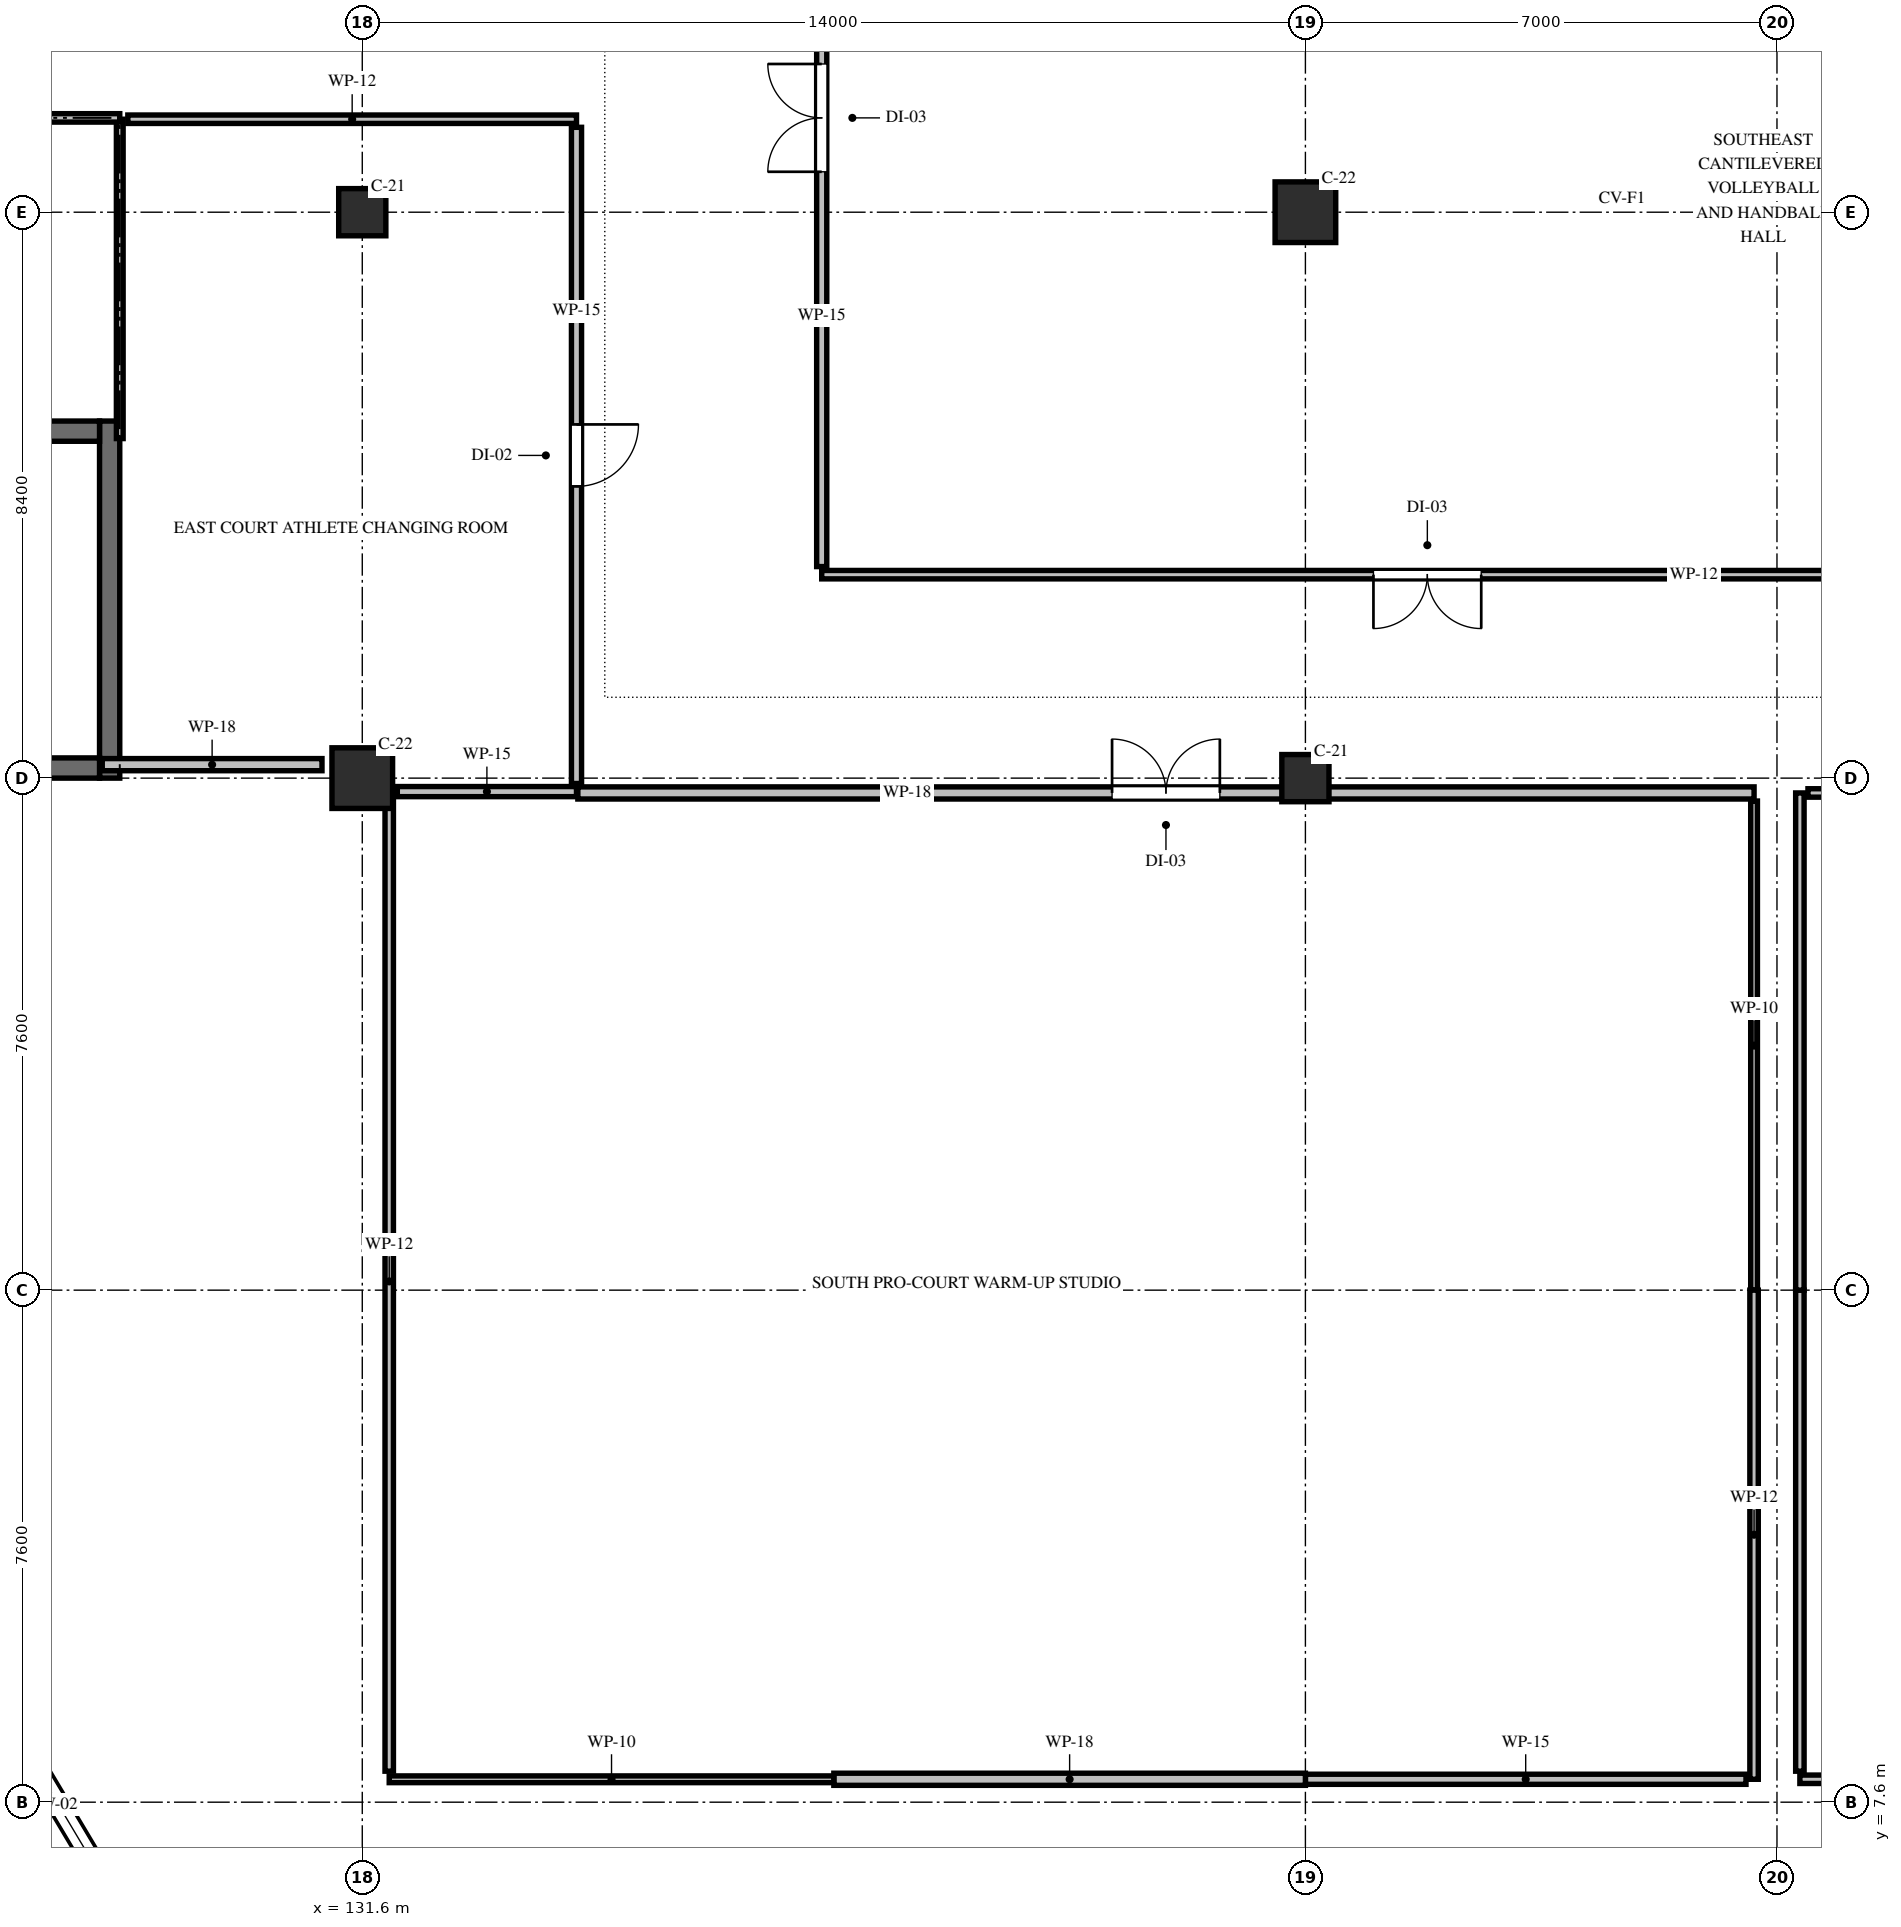
"""IFC4 building model, lengths in metres.
Left out: names, types, materials, properties, quantities, classifications, styles, units other than length and angle.
Written with IfcOpenShell. Run it as: python <this file> out.ifc"""

import sys

from ifc_helpers import new_model, si_unit, direction, frame, frame_2d, origin, origin_2d, place, context, subcontext, project, spatial, rectangle, hollow_rectangle, extrude, element, fill, save


model = new_model("IFC4")
c1 = context("Model", 3, precision=1e-05, world=origin(), true_north=direction((0.0, 1.0)))
c2 = subcontext(c1, "Body", "Model", "MODEL_VIEW")
j1 = project(units=[si_unit("LENGTHUNIT", "METRE"), si_unit("PLANEANGLEUNIT", "RADIAN")], contexts=[c1])
p1 = place(None, origin())
s1 = spatial("IfcSite", under=j1, at=p1, CompositionType="ELEMENT")
p2 = place(p1, origin())
s2 = spatial("IfcBuilding", under=s1, at=p2, CompositionType="ELEMENT")
p3 = place(p2, frame((0.0, 0.0, 16.8)))
s3 = spatial("IfcBuildingStorey", under=s2, at=p3, CompositionType="ELEMENT", Elevation=16.8)
p4 = place(p3, frame((131.6, 22.8, 0.0), z_axis=(0.0, 0.0, 1.0), x_axis=(1.0, 0.0, 0.0)))
e1 = element("IfcColumn", 1, at=p4, inside=s3, PredefinedType="COLUMN", context=c2, shape_type="SweptSolid", body=[
    extrude(hollow_rectangle(XDim=0.9, YDim=0.9, WallThickness=0.036, InnerFilletRadius=0.036, OuterFilletRadius=0.072, at=origin_2d()), origin(), (0.0, 0.0, 1.0), 5.4),
])
for number, where, z_axis, x_axis in (
    (2, (131.6, 31.2, 0.0), (0.0, 0.0, 1.0), (1.0, 0.0, 0.0)),
    (3, (145.6, 22.8, 0.0), (0.0, 0.0, 1.0), (1.0, 0.0, 0.0)),
):
    element("IfcColumn", number, at=place(p3, frame(where, z_axis=z_axis, x_axis=x_axis)), inside=s3, PredefinedType="COLUMN", context=c2, shape_type="SweptSolid", body=[
        extrude(hollow_rectangle(XDim=0.7, YDim=0.7, WallThickness=0.028, InnerFilletRadius=0.028, OuterFilletRadius=0.056, at=origin_2d()), origin(), (0.0, 0.0, 1.0), 5.4),
    ])
p5 = place(p3, frame((145.6, 31.2, 0.0), z_axis=(0.0, 0.0, 1.0), x_axis=(1.0, 0.0, 0.0)))
e4 = element("IfcColumn", 4, at=p5, inside=s3, PredefinedType="COLUMN", context=c2, shape_type="SweptSolid", body=[
    extrude(hollow_rectangle(XDim=0.9, YDim=0.9, WallThickness=0.036, InnerFilletRadius=0.036, OuterFilletRadius=0.072, at=origin_2d()), origin(), (0.0, 0.0, 1.0), 5.4),
])
p6 = place(p3, frame((128.268, 5.587, 0.0), z_axis=(0.0, 0.0, 1.0), x_axis=(-0.512267314441, 0.858826058382, 0.0)))
e5 = element("IfcWall", 5, at=p6, inside=s3, PredefinedType="SOLIDWALL", context=c2, shape_type="SweptSolid", body=[
    extrude(rectangle(XDim=6.901, YDim=0.275, at=frame_2d((3.45, 0.0))), origin(), (0.0, 0.0, 1.0), 5.1),
])
p7 = place(p6, frame((1.4, 0.0, 0.9)))
e6 = element("IfcOpeningElement", 6, at=p7, cuts=e5, PredefinedType="OPENING", context=c2, shape_type="SweptSolid", body=[
    extrude(rectangle(XDim=1.8, YDim=1.6, at=frame_2d((0.9, 0.8))), frame((0.0, 0.147, 0.0), z_axis=(0.0, -1.0, 0.0), x_axis=(1.0, 0.0, 0.0)), (0.0, 0.0, 1.0), 0.295),
])
p8 = place(p6, frame((3.701, 0.0, 0.9)))
e7 = element("IfcOpeningElement", 7, at=p8, cuts=e5, PredefinedType="OPENING", context=c2, shape_type="SweptSolid", body=[
    extrude(rectangle(XDim=1.8, YDim=1.6, at=frame_2d((0.9, 0.8))), frame((0.0, 0.147, 0.0), z_axis=(0.0, -1.0, 0.0), x_axis=(1.0, 0.0, 0.0)), (0.0, 0.0, 1.0), 0.295),
])
p9 = place(p3, frame((127.85, 28.1, 0.0), z_axis=(0.0, 0.0, 1.0), x_axis=(0.0, -1.0, 0.0)))
e8 = element("IfcWall", 8, at=p9, inside=s3, PredefinedType="SHEAR", context=c2, shape_type="SweptSolid", body=[
    extrude(rectangle(XDim=5.3, YDim=0.3, at=frame_2d((2.65, 0.0))), origin(), (0.0, 0.0, 1.0), 5.15),
])
p10 = place(p3, frame((127.7, 22.95, 0.0), z_axis=(0.0, 0.0, 1.0), x_axis=(-1.0, 0.0, 0.0)))
e9 = element("IfcWall", 9, at=p10, inside=s3, PredefinedType="SHEAR", context=c2, shape_type="SweptSolid", body=[
    extrude(rectangle(XDim=9.4, YDim=0.3, at=frame_2d((4.7, 0.0))), origin(), (0.0, 0.0, 1.0), 5.15),
])
p11 = place(p3, frame((118.3, 27.95, 0.0), z_axis=(0.0, 0.0, 1.0), x_axis=(1.0, 0.0, 0.0)))
e10 = element("IfcWall", 10, at=p11, inside=s3, PredefinedType="SHEAR", context=c2, shape_type="SweptSolid", body=[
    extrude(rectangle(XDim=9.4, YDim=0.3, at=frame_2d((4.7, 0.0))), origin(), (0.0, 0.0, 1.0), 5.15),
])
p12 = place(p11, frame((0.55, 0.0, 0.0)))
e11 = element("IfcOpeningElement", 11, at=p12, cuts=e10, PredefinedType="OPENING", context=c2, shape_type="SweptSolid", body=[
    extrude(rectangle(XDim=1.05, YDim=2.2, at=frame_2d((0.525, 1.1))), frame((0.0, 0.16, 0.0), z_axis=(0.0, -1.0, 0.0), x_axis=(1.0, 0.0, 0.0)), (0.0, 0.0, 1.0), 0.32),
])
p13 = place(p3, frame((156.4, 25.82, 0.0), z_axis=(0.0, 0.0, 1.0), x_axis=(-1.0, 0.0, 0.0)))
e12 = element("IfcWall", 12, at=p13, inside=s3, PredefinedType="PARTITIONING", context=c2, shape_type="SweptSolid", body=[
    extrude(rectangle(XDim=17.98, YDim=0.125, at=frame_2d((8.99, 0.0))), origin(), (0.0, 0.0, 1.0), 4.56),
])
p14 = place(p13, frame((8.19, 0.0, 0.0)))
e13 = element("IfcOpeningElement", 13, at=p14, cuts=e12, PredefinedType="OPENING", context=c2, shape_type="SweptSolid", body=[
    extrude(rectangle(XDim=1.6, YDim=2.2, at=frame_2d((0.8, 1.1))), frame((0.0, 0.073, 0.0), z_axis=(0.0, -1.0, 0.0), x_axis=(1.0, 0.0, 0.0)), (0.0, 0.0, 1.0), 0.145),
])
p15 = place(p3, frame((138.42, 25.94, 0.0), z_axis=(0.0, 0.0, 1.0), x_axis=(0.0, 1.0, 0.0)))
e14 = element("IfcWall", 14, at=p15, inside=s3, PredefinedType="PARTITIONING", context=c2, shape_type="SweptSolid", body=[
    extrude(rectangle(XDim=13.32, YDim=0.15, at=frame_2d((6.66, 0.0))), origin(), (0.0, 0.0, 1.0), 3.51),
])
p16 = place(p15, frame((5.86, 0.0, 0.0)))
e15 = element("IfcOpeningElement", 15, at=p16, cuts=e14, PredefinedType="OPENING", context=c2, shape_type="SweptSolid", body=[
    extrude(rectangle(XDim=1.6, YDim=2.2, at=frame_2d((0.8, 1.1))), frame((0.0, 0.085, 0.0), z_axis=(0.0, -1.0, 0.0), x_axis=(1.0, 0.0, 0.0)), (0.0, 0.0, 1.0), 0.17),
])
p17 = place(p3, frame((134.8, 22.58, 0.0), z_axis=(0.0, 0.0, 1.0), x_axis=(1.0, 0.0, 0.0)))
e16 = element("IfcWall", 16, at=p17, inside=s3, PredefinedType="PARTITIONING", context=c2, shape_type="SweptSolid", body=[
    extrude(rectangle(XDim=17.46, YDim=0.18, at=frame_2d((8.73, 0.0))), origin(), (0.0, 0.0, 1.0), 3.51),
])
p18 = place(p17, frame((7.93, 0.0, 0.0)))
e17 = element("IfcOpeningElement", 17, at=p18, cuts=e16, PredefinedType="OPENING", context=c2, shape_type="SweptSolid", body=[
    extrude(rectangle(XDim=1.6, YDim=2.2, at=frame_2d((0.8, 1.1))), frame((0.0, 0.1, 0.0), z_axis=(0.0, -1.0, 0.0), x_axis=(1.0, 0.0, 0.0)), (0.0, 0.0, 1.0), 0.2),
])
p19 = place(p3, frame((152.26, 22.46, 0.0), z_axis=(0.0, 0.0, 1.0), x_axis=(0.0, -1.0, 0.0)))
e18 = element("IfcWall", 18, at=p19, inside=s3, PredefinedType="PARTITIONING", context=c2, shape_type="SweptSolid", body=[
    extrude(rectangle(XDim=7.26, YDim=0.1, at=frame_2d((3.63, 0.0))), origin(), (0.0, 0.0, 1.0), 5.03),
])
p20 = place(p3, frame((152.26, 15.2, 0.0), z_axis=(0.0, 0.0, 1.0), x_axis=(0.0, -1.0, 0.0)))
e19 = element("IfcWall", 19, at=p20, inside=s3, PredefinedType="PARTITIONING", context=c2, shape_type="SweptSolid", body=[
    extrude(rectangle(XDim=7.26, YDim=0.125, at=frame_2d((3.63, 0.0))), origin(), (0.0, 0.0, 1.0), 5.03),
])
p21 = place(p3, frame((152.14, 7.94, 0.0), z_axis=(0.0, 0.0, 1.0), x_axis=(-1.0, 0.0, 0.0)))
e20 = element("IfcWall", 20, at=p21, inside=s3, PredefinedType="PARTITIONING", context=c2, shape_type="SweptSolid", body=[
    extrude(rectangle(XDim=6.54, YDim=0.15, at=frame_2d((3.27, 0.0))), origin(), (0.0, 0.0, 1.0), 5.03),
])
p22 = place(p3, frame((145.6, 7.94, 0.0), z_axis=(0.0, 0.0, 1.0), x_axis=(-1.0, 0.0, 0.0)))
e21 = element("IfcWall", 21, at=p22, inside=s3, PredefinedType="PARTITIONING", context=c2, shape_type="SweptSolid", body=[
    extrude(rectangle(XDim=7.0, YDim=0.18, at=frame_2d((3.5, 0.0))), origin(), (0.0, 0.0, 1.0), 5.03),
])
p23 = place(p3, frame((138.6, 7.94, 0.0), z_axis=(0.0, 0.0, 1.0), x_axis=(-1.0, 0.0, 0.0)))
e22 = element("IfcWall", 22, at=p23, inside=s3, PredefinedType="PARTITIONING", context=c2, shape_type="SweptSolid", body=[
    extrude(rectangle(XDim=6.6, YDim=0.1, at=frame_2d((3.3, 0.0))), origin(), (0.0, 0.0, 1.0), 5.03),
])
p24 = place(p3, frame((132.0, 8.06, 0.0), z_axis=(0.0, 0.0, 1.0), x_axis=(0.0, 1.0, 0.0)))
e23 = element("IfcWall", 23, at=p24, inside=s3, PredefinedType="PARTITIONING", context=c2, shape_type="SweptSolid", body=[
    extrude(rectangle(XDim=14.54, YDim=0.125, at=frame_2d((7.27, 0.0))), origin(), (0.0, 0.0, 1.0), 3.51),
])
p25 = place(p3, frame((132.12, 22.6, 0.0), z_axis=(0.0, 0.0, 1.0), x_axis=(1.0, 0.0, 0.0)))
e24 = element("IfcWall", 24, at=p25, inside=s3, PredefinedType="PARTITIONING", context=c2, shape_type="SweptSolid", body=[
    extrude(rectangle(XDim=2.66, YDim=0.15, at=frame_2d((1.33, 0.0))), origin(), (0.0, 0.0, 1.0), 3.51),
])
p26 = place(p3, frame((131.002, 23.0, 0.0), z_axis=(0.0, 0.0, 1.0), x_axis=(-1.0, 0.0, 0.0)))
e25 = element("IfcWall", 25, at=p26, inside=s3, PredefinedType="PARTITIONING", context=c2, shape_type="SweptSolid", body=[
    extrude(rectangle(XDim=3.262, YDim=0.18, at=frame_2d((1.631, 0.0))), origin(), (0.0, 0.0, 1.0), 5.03),
])
p27 = place(p3, frame((128.0, 27.84, 0.0), z_axis=(0.0, 0.0, 1.0), x_axis=(0.0, 1.0, 0.0)))
e26 = element("IfcWall", 26, at=p27, inside=s3, PredefinedType="PARTITIONING", context=c2, shape_type="SweptSolid", body=[
    extrude(rectangle(XDim=4.74, YDim=0.1, at=frame_2d((2.37, 0.0))), origin(), (0.0, 0.0, 1.0), 5.03),
])
p28 = place(p3, frame((128.12, 32.58, 0.0), z_axis=(0.0, 0.0, 1.0), x_axis=(1.0, 0.0, 0.0)))
e27 = element("IfcWall", 27, at=p28, inside=s3, PredefinedType="PARTITIONING", context=c2, shape_type="SweptSolid", body=[
    extrude(rectangle(XDim=6.66, YDim=0.125, at=frame_2d((3.33, 0.0))), origin(), (0.0, 0.0, 1.0), 4.428),
])
p29 = place(p3, frame((134.78, 32.46, 0.0), z_axis=(0.0, 0.0, 1.0), x_axis=(0.0, -1.0, 0.0)))
e28 = element("IfcWall", 28, at=p29, inside=s3, PredefinedType="PARTITIONING", context=c2, shape_type="SweptSolid", body=[
    extrude(rectangle(XDim=9.74, YDim=0.15, at=frame_2d((4.87, 0.0))), origin(), (0.0, 0.0, 1.0), 3.51),
])
p30 = place(p29, frame((4.41, 0.0, 0.0)))
e29 = element("IfcOpeningElement", 29, at=p30, cuts=e28, PredefinedType="OPENING", context=c2, shape_type="SweptSolid", body=[
    extrude(rectangle(XDim=0.92, YDim=2.15, at=frame_2d((0.46, 1.075))), frame((0.0, 0.085, 0.0), z_axis=(0.0, -1.0, 0.0), x_axis=(1.0, 0.0, 0.0)), (0.0, 0.0, 1.0), 0.17),
])
p31 = place(p3, frame((159.5, 7.94, 0.0), z_axis=(0.0, 0.0, 1.0), x_axis=(-1.0, 0.0, 0.0)))
e30 = element("IfcWall", 30, at=p31, inside=s3, PredefinedType="PARTITIONING", context=c2, shape_type="SweptSolid", body=[
    extrude(rectangle(XDim=6.56, YDim=0.125, at=frame_2d((3.28, 0.0))), origin(), (0.0, 0.0, 1.0), 4.62),
])
p32 = place(p3, frame((152.94, 8.06, 0.0), z_axis=(0.0, 0.0, 1.0), x_axis=(0.0, 1.0, 0.0)))
e31 = element("IfcWall", 31, at=p32, inside=s3, PredefinedType="PARTITIONING", context=c2, shape_type="SweptSolid", body=[
    extrude(rectangle(XDim=7.14, YDim=0.125, at=frame_2d((3.57, 0.0))), origin(), (0.0, 0.0, 1.0), 5.03),
])
p33 = place(p3, frame((152.94, 15.2, 0.0), z_axis=(0.0, 0.0, 1.0), x_axis=(0.0, 1.0, 0.0)))
e32 = element("IfcWall", 32, at=p33, inside=s3, PredefinedType="PARTITIONING", context=c2, shape_type="SweptSolid", body=[
    extrude(rectangle(XDim=7.38, YDim=0.125, at=frame_2d((3.69, 0.0))), origin(), (0.0, 0.0, 1.0), 5.03),
])
p34 = place(p3, frame((153.06, 22.58, 0.0), z_axis=(0.0, 0.0, 1.0), x_axis=(1.0, 0.0, 0.0)))
e33 = element("IfcWall", 33, at=p34, inside=s3, PredefinedType="PARTITIONING", context=c2, shape_type="SweptSolid", body=[
    extrude(rectangle(XDim=3.34, YDim=0.125, at=frame_2d((1.67, 0.0))), origin(), (0.0, 0.0, 1.0), 5.03),
])
p35 = place(p34, frame((1.17, 0.0, 0.0)))
e34 = element("IfcOpeningElement", 34, at=p35, cuts=e33, PredefinedType="OPENING", context=c2, shape_type="SweptSolid", body=[
    extrude(rectangle(XDim=1.0, YDim=2.15, at=frame_2d((0.5, 1.075))), frame((0.0, 0.073, 0.0), z_axis=(0.0, -1.0, 0.0), x_axis=(1.0, 0.0, 0.0)), (0.0, 0.0, 1.0), 0.145),
])
p36 = place(p3, frame((128.0, 32.6, 0.0), z_axis=(0.0, 0.0, 1.0), x_axis=(-1.0, 0.0, 0.0)))
e35 = element("IfcWall", 35, at=p36, inside=s3, PredefinedType="PARTITIONING", context=c2, shape_type="SweptSolid", body=[
    extrude(rectangle(XDim=2.3, YDim=0.125, at=frame_2d((1.15, 0.0))), origin(), (0.0, 0.0, 1.0), 5.03),
])
p37 = place(p7, origin())
e36 = element("IfcWindow", 36, at=p37, inside=s3, PartitioningType="SINGLE_PANEL", PredefinedType="WINDOW", context=c2, shape_type="SweptSolid", body=[
    extrude(rectangle(XDim=1.8, YDim=1.6, at=frame_2d((0.9, 0.8))), frame((0.0, 0.03, 0.0), z_axis=(0.0, -1.0, 0.0), x_axis=(1.0, 0.0, 0.0)), (0.0, 0.0, 1.0), 0.06),
])
fill(e6, e36)
p38 = place(p14, origin())
e37 = element("IfcDoor", 37, at=p38, inside=s3, OperationType="DOUBLE_DOOR_SINGLE_SWING", PredefinedType="DOOR", context=c2, shape_type="SweptSolid", body=[
    extrude(rectangle(XDim=1.6, YDim=2.2, at=frame_2d((0.8, 1.1))), frame((0.0, 0.025, 0.0), z_axis=(0.0, -1.0, 0.0), x_axis=(1.0, 0.0, 0.0)), (0.0, 0.0, 1.0), 0.05),
])
fill(e13, e37)
p39 = place(p18, origin())
e38 = element("IfcDoor", 38, at=p39, inside=s3, OperationType="DOUBLE_DOOR_SINGLE_SWING", PredefinedType="DOOR", context=c2, shape_type="SweptSolid", body=[
    extrude(rectangle(XDim=1.6, YDim=2.2, at=frame_2d((0.8, 1.1))), frame((0.0, 0.025, 0.0), z_axis=(0.0, -1.0, 0.0), x_axis=(1.0, 0.0, 0.0)), (0.0, 0.0, 1.0), 0.05),
])
fill(e17, e38)
p40 = place(p16, origin())
e39 = element("IfcDoor", 39, at=p40, inside=s3, OperationType="DOUBLE_DOOR_SINGLE_SWING", PredefinedType="DOOR", context=c2, shape_type="SweptSolid", body=[
    extrude(rectangle(XDim=1.6, YDim=2.2, at=frame_2d((0.8, 1.1))), frame((0.0, 0.025, 0.0), z_axis=(0.0, -1.0, 0.0), x_axis=(1.0, 0.0, 0.0)), (0.0, 0.0, 1.0), 0.05),
])
fill(e15, e39)
p41 = place(p30, origin())
e40 = element("IfcDoor", 40, at=p41, inside=s3, OperationType="SINGLE_SWING_LEFT", PredefinedType="DOOR", context=c2, shape_type="SweptSolid", body=[
    extrude(rectangle(XDim=0.92, YDim=2.15, at=frame_2d((0.46, 1.075))), frame((0.0, 0.025, 0.0), z_axis=(0.0, -1.0, 0.0), x_axis=(1.0, 0.0, 0.0)), (0.0, 0.0, 1.0), 0.05),
])
fill(e29, e40)
save(model, sys.argv[1])
